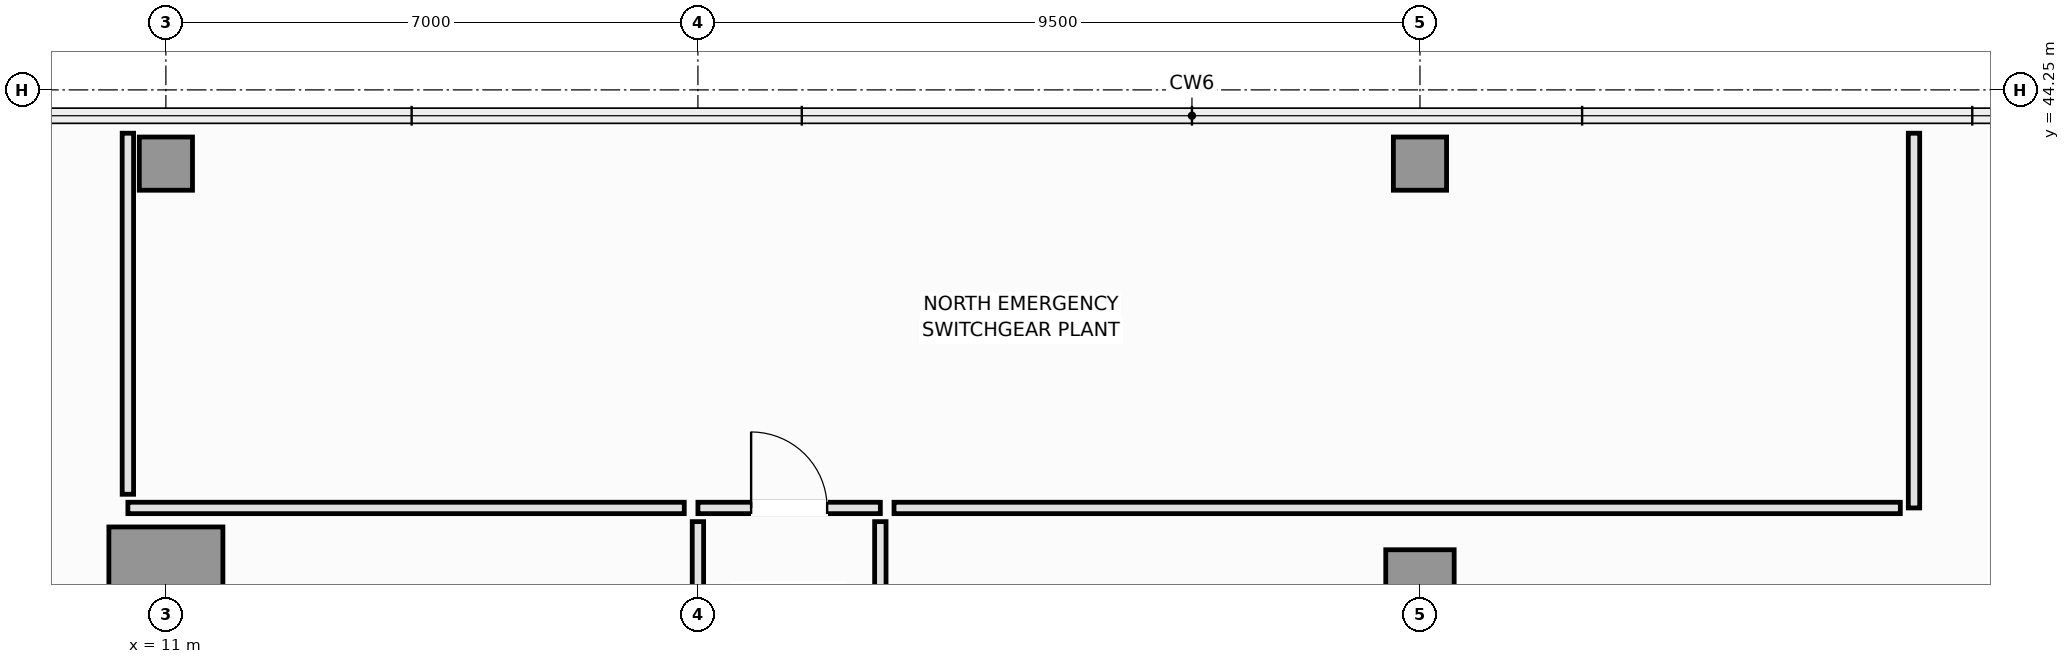
"""IFC4 building model, lengths in metres.
Left out: names, types, materials, properties, quantities, classifications, styles, units other than length and angle.
Written with IfcOpenShell. Run it as: python <this file> out.ifc"""

import sys

from ifc_helpers import new_model, si_unit, direction, frame, frame_2d, origin, origin_2d, place, context, subcontext, project, spatial, rectangle, extrude, element, fill, save


model = new_model("IFC4")
c1 = context("Model", 3, precision=1e-05, world=origin(), true_north=direction((0.0, 1.0)))
c2 = subcontext(c1, "Body", "Model", "MODEL_VIEW")
j1 = project(units=[si_unit("LENGTHUNIT", "METRE"), si_unit("PLANEANGLEUNIT", "RADIAN")], contexts=[c1])
p1 = place(None, origin())
s1 = spatial("IfcSite", under=j1, at=p1, CompositionType="ELEMENT")
p2 = place(p1, origin())
s2 = spatial("IfcBuilding", under=s1, at=p2, CompositionType="ELEMENT")
p3 = place(p2, frame((0.0, 0.0, 296.65)))
s3 = spatial("IfcBuildingStorey", under=s2, at=p3, CompositionType="ELEMENT", Elevation=296.65)
p4 = place(p3, frame((11.0, 37.75, 0.0), z_axis=(0.0, 0.0, 1.0), x_axis=(1.0, 0.0, 0.0)))
e1 = element("IfcColumn", 1, at=p4, inside=s3, PredefinedType="COLUMN", context=c2, shape_type="SweptSolid", body=[
    extrude(rectangle(XDim=1.5, YDim=1.5, at=origin_2d()), origin(), (0.0, 0.0, 1.0), 6.4),
])
p5 = place(p3, frame((27.5, 37.75, 0.0), z_axis=(0.0, 0.0, 1.0), x_axis=(1.0, 0.0, 0.0)))
e2 = element("IfcColumn", 2, at=p5, inside=s3, PredefinedType="COLUMN", context=c2, shape_type="SweptSolid", body=[
    extrude(rectangle(XDim=0.9, YDim=0.9, at=origin_2d()), origin(), (0.0, 0.0, 1.0), 6.4),
])
for number, where, z_axis, x_axis in (
    (3, (11.0, 43.28, 0.0), (0.0, 0.0, 1.0), (1.0, 0.0, 0.0)),
    (4, (27.5, 43.28, 0.0), (0.0, 0.0, 1.0), (1.0, 0.0, 0.0)),
):
    element("IfcColumn", number, at=place(p3, frame(where, z_axis=z_axis, x_axis=x_axis)), inside=s3, PredefinedType="COLUMN", context=c2, shape_type="SweptSolid", body=[
        extrude(rectangle(XDim=0.7, YDim=0.7, at=origin_2d()), origin(), (0.0, 0.0, 1.0), 6.4),
    ])
p6 = place(p3, frame((18.0, 38.75, 0.0), z_axis=(0.0, 0.0, 1.0), x_axis=(1.0, 0.0, 0.0)))
e5 = element("IfcWall", 5, at=p6, inside=s3, PredefinedType="PARTITIONING", context=c2, shape_type="SweptSolid", body=[
    extrude(rectangle(XDim=2.4, YDim=0.15, at=frame_2d((1.2, 0.0))), origin(), (0.0, 0.0, 1.0), 6.2),
])
p7 = place(p6, frame((0.7, 0.0, 0.0)))
e6 = element("IfcOpeningElement", 6, at=p7, cuts=e5, PredefinedType="OPENING", context=c2, shape_type="SweptSolid", body=[
    extrude(rectangle(XDim=1.0, YDim=2.15, at=frame_2d((0.5, 1.075))), frame((0.0, 0.085, 0.0), z_axis=(0.0, -1.0, 0.0), x_axis=(1.0, 0.0, 0.0)), (0.0, 0.0, 1.0), 0.17),
])
p8 = place(p3, frame((17.82, 38.75, 0.0), z_axis=(0.0, 0.0, 1.0), x_axis=(-1.0, 0.0, 0.0)))
e7 = element("IfcWall", 7, at=p8, inside=s3, PredefinedType="PARTITIONING", context=c2, shape_type="SweptSolid", body=[
    extrude(rectangle(XDim=7.32, YDim=0.15, at=frame_2d((3.66, 0.0))), origin(), (0.0, 0.0, 1.0), 6.2),
])
p9 = place(p3, frame((10.5, 38.93, 0.0), z_axis=(0.0, 0.0, 1.0), x_axis=(0.0, 1.0, 0.0)))
e8 = element("IfcWall", 8, at=p9, inside=s3, PredefinedType="PARTITIONING", context=c2, shape_type="SweptSolid", body=[
    extrude(rectangle(XDim=4.75, YDim=0.15, at=frame_2d((2.375, 0.0))), origin(), (0.0, 0.0, 1.0), 6.2),
])
p10 = place(p3, frame((34.0, 43.68, 0.0), z_axis=(0.0, 0.0, 1.0), x_axis=(0.0, -1.0, 0.0)))
e9 = element("IfcWall", 9, at=p10, inside=s3, PredefinedType="PARTITIONING", context=c2, shape_type="SweptSolid", body=[
    extrude(rectangle(XDim=4.93, YDim=0.15, at=frame_2d((2.465, 0.0))), origin(), (0.0, 0.0, 1.0), 6.2),
])
p11 = place(p3, frame((33.82, 38.75, 0.0), z_axis=(0.0, 0.0, 1.0), x_axis=(-1.0, 0.0, 0.0)))
e10 = element("IfcWall", 10, at=p11, inside=s3, PredefinedType="PARTITIONING", context=c2, shape_type="SweptSolid", body=[
    extrude(rectangle(XDim=13.24, YDim=0.15, at=frame_2d((6.62, 0.0))), origin(), (0.0, 0.0, 1.0), 6.2),
])
p12 = place(p3, frame((20.4, 38.57, 0.0), z_axis=(0.0, 0.0, 1.0), x_axis=(0.0, -1.0, 0.0)))
e11 = element("IfcWall", 11, at=p12, inside=s3, PredefinedType="PARTITIONING", context=c2, shape_type="SweptSolid", body=[
    extrude(rectangle(XDim=1.77, YDim=0.15, at=frame_2d((0.885, 0.0))), origin(), (0.0, 0.0, 1.0), 6.2),
])
p13 = place(p3, frame((18.0, 36.72, 0.0), z_axis=(0.0, 0.0, 1.0), x_axis=(0.0, 1.0, 0.0)))
e12 = element("IfcWall", 12, at=p13, inside=s3, PredefinedType="PARTITIONING", context=c2, shape_type="SweptSolid", body=[
    extrude(rectangle(XDim=1.85, YDim=0.15, at=frame_2d((0.925, 0.0))), origin(), (0.0, 0.0, 1.0), 6.2),
])
p14 = place(p7, origin())
e13 = element("IfcDoor", 13, at=p14, inside=s3, OperationType="SINGLE_SWING_LEFT", PredefinedType="DOOR", context=c2, shape_type="SweptSolid", body=[
    extrude(rectangle(XDim=1.0, YDim=2.15, at=frame_2d((0.5, 1.075))), frame((0.0, 0.025, 0.0), z_axis=(0.0, -1.0, 0.0), x_axis=(1.0, 0.0, 0.0)), (0.0, 0.0, 1.0), 0.05),
])
fill(e6, e13)
save(model, sys.argv[1])
